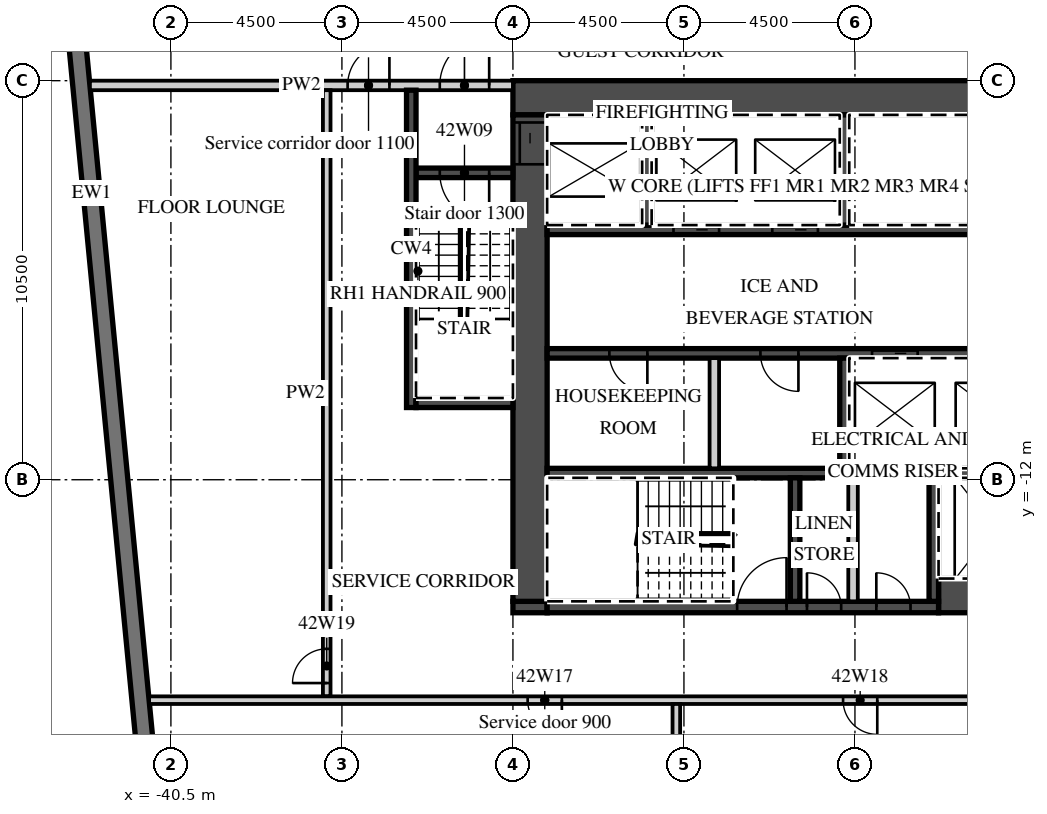
"""IFC4 building model, lengths in metres.
Left out: names, types, materials, properties, quantities, classifications, styles, units other than length and angle.
Written with IfcOpenShell. Run it as: python <this file> out.ifc"""

import sys

from ifc_helpers import new_model, si_unit, direction, frame, frame_2d, origin, place, context, subcontext, project, spatial, rectangle, extrude, element, fill, save


model = new_model("IFC4")
c1 = context("Model", 3, precision=1e-05, world=origin(), true_north=direction((0.0, 1.0)))
c2 = subcontext(c1, "Body", "Model", "MODEL_VIEW")
j1 = project(units=[si_unit("LENGTHUNIT", "METRE"), si_unit("PLANEANGLEUNIT", "RADIAN")], contexts=[c1])
p1 = place(None, origin())
s1 = spatial("IfcSite", under=j1, at=p1, CompositionType="ELEMENT")
p2 = place(p1, origin())
s2 = spatial("IfcBuilding", under=s1, at=p2, CompositionType="ELEMENT")
p3 = place(p2, frame((0.0, 0.0, 180.1)))
s3 = spatial("IfcBuildingStorey", under=s2, at=p3, CompositionType="ELEMENT", Elevation=180.1)
p4 = place(p3, frame((-44.214, 12.466, 0.0), z_axis=(0.0, 0.0, 1.0), x_axis=(0.095847314626, -0.995396047952, 0.0)))
e1 = element("IfcWall", 1, at=p4, inside=s3, PredefinedType="SOLIDWALL", context=c2, shape_type="SweptSolid", body=[
    extrude(rectangle(XDim=34.0, YDim=0.45, at=frame_2d((17.0, 0.0))), origin(), (0.0, 0.0, 1.0), 3.02),
])
p5 = place(p4, frame((2.865, 0.0, 0.45)))
e2 = element("IfcOpeningElement", 2, at=p5, cuts=e1, PredefinedType="OPENING", context=c2, shape_type="SweptSolid", body=[
    extrude(rectangle(XDim=3.3, YDim=2.25, at=frame_2d((1.65, 1.125))), frame((0.0, 0.235, 0.0), z_axis=(0.0, -1.0, 0.0), x_axis=(1.0, 0.0, 0.0)), (0.0, 0.0, 1.0), 0.47),
])
p6 = place(p4, frame((7.386, 0.0, 0.45)))
e3 = element("IfcOpeningElement", 3, at=p6, cuts=e1, PredefinedType="OPENING", context=c2, shape_type="SweptSolid", body=[
    extrude(rectangle(XDim=3.3, YDim=2.25, at=frame_2d((1.65, 1.125))), frame((0.0, 0.235, 0.0), z_axis=(0.0, -1.0, 0.0), x_axis=(1.0, 0.0, 0.0)), (0.0, 0.0, 1.0), 0.47),
])
p7 = place(p3, frame((-31.5, -1.95, 0.0), z_axis=(0.0, 0.0, 1.0), x_axis=(1.0, 0.0, 0.0)))
e4 = element("IfcWall", 4, at=p7, inside=s3, PredefinedType="SHEAR", context=c2, shape_type="SweptSolid", body=[
    extrude(rectangle(XDim=18.0, YDim=0.9, at=frame_2d((9.0, 0.0))), origin(), (0.0, 0.0, 1.0), 3.02),
])
p8 = place(p7, frame((14.725, 0.0, 0.0)))
e5 = element("IfcOpeningElement", 5, at=p8, cuts=e4, PredefinedType="OPENING", context=c2, shape_type="SweptSolid", body=[
    extrude(rectangle(XDim=1.8, YDim=2.1, at=frame_2d((0.9, 1.05))), frame((0.0, 0.46, 0.0), z_axis=(0.0, -1.0, 0.0), x_axis=(1.0, 0.0, 0.0)), (0.0, 0.0, 1.0), 0.92),
])
p9 = place(p3, frame((-20.3, -15.05, 0.0), z_axis=(0.0, 0.0, 1.0), x_axis=(1.0, 0.0, 0.0)))
e6 = element("IfcWall", 6, at=p9, inside=s3, PredefinedType="SHEAR", context=c2, shape_type="SweptSolid", body=[
    extrude(rectangle(XDim=6.8, YDim=0.9, at=frame_2d((3.4, 0.0))), origin(), (0.0, 0.0, 1.0), 3.02),
])
p10 = place(p9, frame((0.875, 0.0, 0.0)))
e7 = element("IfcOpeningElement", 7, at=p10, cuts=e6, PredefinedType="OPENING", context=c2, shape_type="SweptSolid", body=[
    extrude(rectangle(XDim=1.2, YDim=2.1, at=frame_2d((0.6, 1.05))), frame((0.0, 0.46, 0.0), z_axis=(0.0, -1.0, 0.0), x_axis=(1.0, 0.0, 0.0)), (0.0, 0.0, 1.0), 0.92),
])
p11 = place(p3, frame((-31.5, -15.35, 0.0), z_axis=(0.0, 0.0, 1.0), x_axis=(1.0, 0.0, 0.0)))
e8 = element("IfcWall", 8, at=p11, inside=s3, PredefinedType="SHEAR", context=c2, shape_type="SweptSolid", body=[
    extrude(rectangle(XDim=0.9, YDim=0.3, at=frame_2d((0.45, 0.0))), origin(), (0.0, 0.0, 1.0), 3.02),
])
p12 = place(p3, frame((-30.6, -15.35, 0.0), z_axis=(0.0, 0.0, 1.0), x_axis=(1.0, 0.0, 0.0)))
e9 = element("IfcWall", 9, at=p12, inside=s3, PredefinedType="SHEAR", context=c2, shape_type="SweptSolid", body=[
    extrude(rectangle(XDim=10.3, YDim=0.3, at=frame_2d((5.15, 0.0))), origin(), (0.0, 0.0, 1.0), 3.02),
])
p13 = place(p12, frame((5.0, 0.0, 0.0)))
e10 = element("IfcOpeningElement", 10, at=p13, cuts=e9, PredefinedType="OPENING", context=c2, shape_type="SweptSolid", body=[
    extrude(rectangle(XDim=1.3, YDim=2.1, at=frame_2d((0.65, 1.05))), frame((0.0, 0.16, 0.0), z_axis=(0.0, -1.0, 0.0), x_axis=(1.0, 0.0, 0.0)), (0.0, 0.0, 1.0), 0.32),
])
p14 = place(p12, frame((6.837, 0.0, 0.0)))
e11 = element("IfcOpeningElement", 11, at=p14, cuts=e9, PredefinedType="OPENING", context=c2, shape_type="SweptSolid", body=[
    extrude(rectangle(XDim=0.9, YDim=2.1, at=frame_2d((0.45, 1.05))), frame((0.0, 0.16, 0.0), z_axis=(0.0, -1.0, 0.0), x_axis=(1.0, 0.0, 0.0)), (0.0, 0.0, 1.0), 0.32),
])
p15 = place(p12, frame((8.663, 0.0, 0.0)))
e12 = element("IfcOpeningElement", 12, at=p15, cuts=e9, PredefinedType="OPENING", context=c2, shape_type="SweptSolid", body=[
    extrude(rectangle(XDim=0.9, YDim=2.1, at=frame_2d((0.45, 1.05))), frame((0.0, 0.16, 0.0), z_axis=(0.0, -1.0, 0.0), x_axis=(1.0, 0.0, 0.0)), (0.0, 0.0, 1.0), 0.32),
])
p16 = place(p3, frame((-31.05, -15.2, 0.0), z_axis=(0.0, 0.0, 1.0), x_axis=(0.0, 1.0, 0.0)))
e13 = element("IfcWall", 13, at=p16, inside=s3, PredefinedType="SHEAR", context=c2, shape_type="SweptSolid", body=[
    extrude(rectangle(XDim=12.8, YDim=0.9, at=frame_2d((6.4, 0.0))), origin(), (0.0, 0.0, 1.0), 3.02),
])
p17 = place(p16, frame((11.5, 0.0, 0.0)))
e14 = element("IfcOpeningElement", 14, at=p17, cuts=e13, PredefinedType="OPENING", context=c2, shape_type="SweptSolid", body=[
    extrude(rectangle(XDim=1.1, YDim=2.1, at=frame_2d((0.55, 1.05))), frame((0.0, 0.46, 0.0), z_axis=(0.0, -1.0, 0.0), x_axis=(1.0, 0.0, 0.0)), (0.0, 0.0, 1.0), 0.92),
])
p18 = place(p3, frame((-30.6, -5.425, 0.0), z_axis=(0.0, 0.0, 1.0), x_axis=(1.0, 0.0, 0.0)))
e15 = element("IfcWall", 15, at=p18, inside=s3, PredefinedType="SHEAR", context=c2, shape_type="SweptSolid", body=[
    extrude(rectangle(XDim=13.0, YDim=0.25, at=frame_2d((6.5, 0.0))), origin(), (0.0, 0.0, 1.0), 3.02),
])
p19 = place(p18, frame((3.325, 0.0, 0.0)))
e16 = element("IfcOpeningElement", 16, at=p19, cuts=e15, PredefinedType="OPENING", context=c2, shape_type="SweptSolid", body=[
    extrude(rectangle(XDim=1.2, YDim=2.1, at=frame_2d((0.6, 1.05))), frame((0.0, 0.135, 0.0), z_axis=(0.0, -1.0, 0.0), x_axis=(1.0, 0.0, 0.0)), (0.0, 0.0, 1.0), 0.27),
])
p20 = place(p18, frame((5.925, 0.0, 0.0)))
e17 = element("IfcOpeningElement", 17, at=p20, cuts=e15, PredefinedType="OPENING", context=c2, shape_type="SweptSolid", body=[
    extrude(rectangle(XDim=1.2, YDim=2.1, at=frame_2d((0.6, 1.05))), frame((0.0, 0.135, 0.0), z_axis=(0.0, -1.0, 0.0), x_axis=(1.0, 0.0, 0.0)), (0.0, 0.0, 1.0), 0.27),
])
for number, where, z_axis, x_axis in (
    (18, (-27.975, -5.3, 0.0), (0.0, 0.0, 1.0), (0.0, 1.0, 0.0)),
    (19, (-22.775, -5.3, 0.0), (0.0, 0.0, 1.0), (0.0, 1.0, 0.0)),
):
    element("IfcWall", number, at=place(p3, frame(where, z_axis=z_axis, x_axis=x_axis)), inside=s3, PredefinedType="SHEAR", context=c2, shape_type="SweptSolid", body=[
        extrude(rectangle(XDim=2.9, YDim=0.25, at=frame_2d((1.45, 0.0))), origin(), (0.0, 0.0, 1.0), 3.02),
    ])
p21 = place(p3, frame((-30.6, -8.675, 0.0), z_axis=(0.0, 0.0, 1.0), x_axis=(1.0, 0.0, 0.0)))
e20 = element("IfcWall", 20, at=p21, inside=s3, PredefinedType="SHEAR", context=c2, shape_type="SweptSolid", body=[
    extrude(rectangle(XDim=16.2, YDim=0.25, at=frame_2d((8.1, 0.0))), origin(), (0.0, 0.0, 1.0), 3.02),
])
p22 = place(p21, frame((8.55, 0.0, 0.0)))
e21 = element("IfcOpeningElement", 21, at=p22, cuts=e20, PredefinedType="OPENING", context=c2, shape_type="SweptSolid", body=[
    extrude(rectangle(XDim=1.2, YDim=2.1, at=frame_2d((0.6, 1.05))), frame((0.0, 0.135, 0.0), z_axis=(0.0, -1.0, 0.0), x_axis=(1.0, 0.0, 0.0)), (0.0, 0.0, 1.0), 0.27),
])
p23 = place(p21, frame((11.2, 0.0, 0.0)))
e22 = element("IfcOpeningElement", 22, at=p23, cuts=e20, PredefinedType="OPENING", context=c2, shape_type="SweptSolid", body=[
    extrude(rectangle(XDim=1.2, YDim=2.1, at=frame_2d((0.6, 1.05))), frame((0.0, 0.135, 0.0), z_axis=(0.0, -1.0, 0.0), x_axis=(1.0, 0.0, 0.0)), (0.0, 0.0, 1.0), 0.27),
])
p24 = place(p21, frame((14.25, 0.0, 0.0)))
e23 = element("IfcOpeningElement", 23, at=p24, cuts=e20, PredefinedType="OPENING", context=c2, shape_type="SweptSolid", body=[
    extrude(rectangle(XDim=1.3, YDim=2.1, at=frame_2d((0.65, 1.05))), frame((0.0, 0.135, 0.0), z_axis=(0.0, -1.0, 0.0), x_axis=(1.0, 0.0, 0.0)), (0.0, 0.0, 1.0), 0.27),
])
p25 = place(p21, frame((1.637, 0.0, 0.0)))
e24 = element("IfcOpeningElement", 24, at=p25, cuts=e20, PredefinedType="OPENING", context=c2, shape_type="SweptSolid", body=[
    extrude(rectangle(XDim=1.0, YDim=2.1, at=frame_2d((0.5, 1.05))), frame((0.0, 0.135, 0.0), z_axis=(0.0, -1.0, 0.0), x_axis=(1.0, 0.0, 0.0)), (0.0, 0.0, 1.0), 0.27),
])
p26 = place(p21, frame((5.613, 0.0, 0.0)))
e25 = element("IfcOpeningElement", 25, at=p26, cuts=e20, PredefinedType="OPENING", context=c2, shape_type="SweptSolid", body=[
    extrude(rectangle(XDim=1.0, YDim=2.1, at=frame_2d((0.5, 1.05))), frame((0.0, 0.135, 0.0), z_axis=(0.0, -1.0, 0.0), x_axis=(1.0, 0.0, 0.0)), (0.0, 0.0, 1.0), 0.27),
])
p27 = place(p3, frame((-30.6, -11.825, 0.0), z_axis=(0.0, 0.0, 1.0), x_axis=(1.0, 0.0, 0.0)))
e26 = element("IfcWall", 26, at=p27, inside=s3, PredefinedType="SHEAR", context=c2, shape_type="SweptSolid", body=[
    extrude(rectangle(XDim=13.25, YDim=0.25, at=frame_2d((6.625, 0.0))), origin(), (0.0, 0.0, 1.0), 3.02),
])
p28 = place(p3, frame((-22.775, -11.7, 0.0), z_axis=(0.0, 0.0, 1.0), x_axis=(0.0, 1.0, 0.0)))
e27 = element("IfcWall", 27, at=p28, inside=s3, PredefinedType="SHEAR", context=c2, shape_type="SweptSolid", body=[
    extrude(rectangle(XDim=2.9, YDim=0.25, at=frame_2d((1.45, 0.0))), origin(), (0.0, 0.0, 1.0), 3.02),
])
p29 = place(p3, frame((-26.2, -11.7, 0.0), z_axis=(0.0, 0.0, 1.0), x_axis=(0.0, 1.0, 0.0)))
e28 = element("IfcWall", 28, at=p29, inside=s3, PredefinedType="PARTITIONING", context=c2, shape_type="SweptSolid", body=[
    extrude(rectangle(XDim=2.9, YDim=0.25, at=frame_2d((1.45, 0.0))), origin(), (0.0, 0.0, 1.0), 3.02),
])
for number, where, z_axis, x_axis in (
    (29, (-20.425, -15.2, 0.0), (0.0, 0.0, 1.0), (0.0, 1.0, 0.0)),
    (30, (-24.075, -15.2, 0.0), (0.0, 0.0, 1.0), (0.0, 1.0, 0.0)),
):
    element("IfcWall", number, at=place(p3, frame(where, z_axis=z_axis, x_axis=x_axis)), inside=s3, PredefinedType="SHEAR", context=c2, shape_type="SweptSolid", body=[
        extrude(rectangle(XDim=3.25, YDim=0.25, at=frame_2d((1.625, 0.0))), origin(), (0.0, 0.0, 1.0), 3.02),
    ])
p30 = place(p3, frame((-22.55, -15.2, 0.0), z_axis=(0.0, 0.0, 1.0), x_axis=(0.0, 1.0, 0.0)))
e31 = element("IfcWall", 31, at=p30, inside=s3, PredefinedType="PARTITIONING", context=c2, shape_type="SweptSolid", body=[
    extrude(rectangle(XDim=3.25, YDim=0.25, at=frame_2d((1.625, 0.0))), origin(), (0.0, 0.0, 1.0), 3.02),
])
p31 = place(p3, frame((-42.632, -1.625, 0.0), z_axis=(0.0, 0.0, 1.0), x_axis=(1.0, 0.0, 0.0)))
e32 = element("IfcWall", 32, at=p31, inside=s3, PredefinedType="PARTITIONING", context=c2, shape_type="SweptSolid", body=[
    extrude(rectangle(XDim=11.132, YDim=0.25, at=frame_2d((5.566, 0.0))), origin(), (0.0, 0.0, 1.0), 3.02),
])
p32 = place(p31, frame((9.207, 0.0, 0.0)))
e33 = element("IfcOpeningElement", 33, at=p32, cuts=e32, PredefinedType="OPENING", context=c2, shape_type="SweptSolid", body=[
    extrude(rectangle(XDim=1.3, YDim=2.1, at=frame_2d((0.65, 1.05))), frame((0.0, 0.135, 0.0), z_axis=(0.0, -1.0, 0.0), x_axis=(1.0, 0.0, 0.0)), (0.0, 0.0, 1.0), 0.27),
])
p33 = place(p31, frame((6.781, 0.0, 0.0)))
e34 = element("IfcOpeningElement", 34, at=p33, cuts=e32, PredefinedType="OPENING", context=c2, shape_type="SweptSolid", body=[
    extrude(rectangle(XDim=1.1, YDim=2.1, at=frame_2d((0.55, 1.05))), frame((0.0, 0.135, 0.0), z_axis=(0.0, -1.0, 0.0), x_axis=(1.0, 0.0, 0.0)), (0.0, 0.0, 1.0), 0.27),
])
p34 = place(p3, frame((-34.05, -3.925, 0.0), z_axis=(0.0, 0.0, 1.0), x_axis=(1.0, 0.0, 0.0)))
e35 = element("IfcWall", 35, at=p34, inside=s3, PredefinedType="SHEAR", context=c2, shape_type="SweptSolid", body=[
    extrude(rectangle(XDim=2.55, YDim=0.25, at=frame_2d((1.275, 0.0))), origin(), (0.0, 0.0, 1.0), 3.02),
])
p35 = place(p34, frame((0.625, 0.0, 0.0)))
e36 = element("IfcOpeningElement", 36, at=p35, cuts=e35, PredefinedType="OPENING", context=c2, shape_type="SweptSolid", body=[
    extrude(rectangle(XDim=1.3, YDim=2.1, at=frame_2d((0.65, 1.05))), frame((0.0, 0.135, 0.0), z_axis=(0.0, -1.0, 0.0), x_axis=(1.0, 0.0, 0.0)), (0.0, 0.0, 1.0), 0.27),
])
p36 = place(p3, frame((-34.175, -10.1, 0.0), z_axis=(0.0, 0.0, 1.0), x_axis=(0.0, 1.0, 0.0)))
e37 = element("IfcWall", 37, at=p36, inside=s3, PredefinedType="SHEAR", context=c2, shape_type="SweptSolid", body=[
    extrude(rectangle(XDim=8.35, YDim=0.25, at=frame_2d((4.175, 0.0))), origin(), (0.0, 0.0, 1.0), 3.02),
])
p37 = place(p3, frame((-34.05, -9.975, 0.0), z_axis=(0.0, 0.0, 1.0), x_axis=(1.0, 0.0, 0.0)))
e38 = element("IfcWall", 38, at=p37, inside=s3, PredefinedType="SHEAR", context=c2, shape_type="SweptSolid", body=[
    extrude(rectangle(XDim=2.55, YDim=0.25, at=frame_2d((1.275, 0.0))), origin(), (0.0, 0.0, 1.0), 3.02),
])
p38 = place(p3, frame((-36.4, -17.7, 0.0), z_axis=(0.0, 0.0, 1.0), x_axis=(0.0, 1.0, 0.0)))
e39 = element("IfcWall", 39, at=p38, inside=s3, PredefinedType="PARTITIONING", context=c2, shape_type="SweptSolid", body=[
    extrude(rectangle(XDim=15.95, YDim=0.2, at=frame_2d((7.975, 0.0))), origin(), (0.0, 0.0, 1.0), 3.02),
])
p39 = place(p38, frame((0.35, 0.0, 0.0)))
e40 = element("IfcOpeningElement", 40, at=p39, cuts=e39, PredefinedType="OPENING", context=c2, shape_type="SweptSolid", body=[
    extrude(rectangle(XDim=0.9, YDim=2.1, at=frame_2d((0.45, 1.05))), frame((0.0, 0.11, 0.0), z_axis=(0.0, -1.0, 0.0), x_axis=(1.0, 0.0, 0.0)), (0.0, 0.0, 1.0), 0.22),
])
p40 = place(p3, frame((-41.074, -17.8, 0.0), z_axis=(0.0, 0.0, 1.0), x_axis=(1.0, 0.0, 0.0)))
e41 = element("IfcWall", 41, at=p40, inside=s3, PredefinedType="PARTITIONING", context=c2, shape_type="SweptSolid", body=[
    extrude(rectangle(XDim=27.474, YDim=0.2, at=frame_2d((13.737, 0.0))), origin(), (0.0, 0.0, 1.0), 3.02),
])
p41 = place(p40, frame((9.962, 0.0, 0.0)))
e42 = element("IfcOpeningElement", 42, at=p41, cuts=e41, PredefinedType="OPENING", context=c2, shape_type="SweptSolid", body=[
    extrude(rectangle(XDim=0.9, YDim=2.1, at=frame_2d((0.45, 1.05))), frame((0.0, 0.11, 0.0), z_axis=(0.0, -1.0, 0.0), x_axis=(1.0, 0.0, 0.0)), (0.0, 0.0, 1.0), 0.22),
])
p42 = place(p40, frame((18.262, 0.0, 0.0)))
e43 = element("IfcOpeningElement", 43, at=p42, cuts=e41, PredefinedType="OPENING", context=c2, shape_type="SweptSolid", body=[
    extrude(rectangle(XDim=0.9, YDim=2.1, at=frame_2d((0.45, 1.05))), frame((0.0, 0.11, 0.0), z_axis=(0.0, -1.0, 0.0), x_axis=(1.0, 0.0, 0.0)), (0.0, 0.0, 1.0), 0.22),
])
p43 = place(p3, frame((-27.2, -23.621, 0.0), z_axis=(0.0, 0.0, 1.0), x_axis=(0.0, 1.0, 0.0)))
e44 = element("IfcWall", 44, at=p43, inside=s3, PredefinedType="PARTITIONING", context=c2, shape_type="SweptSolid", body=[
    extrude(rectangle(XDim=5.721, YDim=0.2, at=frame_2d((2.86, 0.0))), origin(), (0.0, 0.0, 1.0), 3.02),
])
p44 = place(p22, origin())
e45 = element("IfcDoor", 45, at=p44, inside=s3, OperationType="SLIDING_TO_LEFT", PredefinedType="DOOR", context=c2, shape_type="SweptSolid", body=[
    extrude(rectangle(XDim=1.2, YDim=2.1, at=frame_2d((0.6, 1.05))), frame((0.0, 0.025, 0.0), z_axis=(0.0, -1.0, 0.0), x_axis=(1.0, 0.0, 0.0)), (0.0, 0.0, 1.0), 0.05),
])
fill(e21, e45)
p45 = place(p19, origin())
e46 = element("IfcDoor", 46, at=p45, inside=s3, OperationType="SLIDING_TO_RIGHT", PredefinedType="DOOR", context=c2, shape_type="SweptSolid", body=[
    extrude(rectangle(XDim=1.2, YDim=2.1, at=frame_2d((0.6, 1.05))), frame((0.0, 0.025, 0.0), z_axis=(0.0, -1.0, 0.0), x_axis=(1.0, 0.0, 0.0)), (0.0, 0.0, 1.0), 0.05),
])
fill(e16, e46)
p46 = place(p20, origin())
e47 = element("IfcDoor", 47, at=p46, inside=s3, OperationType="SLIDING_TO_RIGHT", PredefinedType="DOOR", context=c2, shape_type="SweptSolid", body=[
    extrude(rectangle(XDim=1.2, YDim=2.1, at=frame_2d((0.6, 1.05))), frame((0.0, 0.025, 0.0), z_axis=(0.0, -1.0, 0.0), x_axis=(1.0, 0.0, 0.0)), (0.0, 0.0, 1.0), 0.05),
])
fill(e17, e47)
p47 = place(p17, origin())
e48 = element("IfcDoor", 48, at=p47, inside=s3, OperationType="SLIDING_TO_RIGHT", PredefinedType="DOOR", context=c2, shape_type="SweptSolid", body=[
    extrude(rectangle(XDim=1.1, YDim=2.1, at=frame_2d((0.55, 1.05))), frame((0.0, 0.025, 0.0), z_axis=(0.0, -1.0, 0.0), x_axis=(1.0, 0.0, 0.0)), (0.0, 0.0, 1.0), 0.05),
])
fill(e14, e48)
p48 = place(p32, origin())
e49 = element("IfcDoor", 49, at=p48, inside=s3, OperationType="SINGLE_SWING_RIGHT", PredefinedType="DOOR", context=c2, shape_type="SweptSolid", body=[
    extrude(rectangle(XDim=1.3, YDim=2.1, at=frame_2d((0.65, 1.05))), frame((0.0, 0.025, 0.0), z_axis=(0.0, -1.0, 0.0), x_axis=(1.0, 0.0, 0.0)), (0.0, 0.0, 1.0), 0.05),
])
fill(e33, e49)
p49 = place(p35, origin())
e50 = element("IfcDoor", 50, at=p49, inside=s3, OperationType="SINGLE_SWING_RIGHT", PredefinedType="DOOR", context=c2, shape_type="SweptSolid", body=[
    extrude(rectangle(XDim=1.3, YDim=2.1, at=frame_2d((0.65, 1.05))), frame((0.0, 0.025, 0.0), z_axis=(0.0, -1.0, 0.0), x_axis=(1.0, 0.0, 0.0)), (0.0, 0.0, 1.0), 0.05),
])
fill(e36, e50)
p50 = place(p33, origin())
e51 = element("IfcDoor", 51, at=p50, inside=s3, OperationType="SINGLE_SWING_RIGHT", PredefinedType="DOOR", context=c2, shape_type="SweptSolid", body=[
    extrude(rectangle(XDim=1.1, YDim=2.1, at=frame_2d((0.55, 1.05))), frame((0.0, 0.025, 0.0), z_axis=(0.0, -1.0, 0.0), x_axis=(1.0, 0.0, 0.0)), (0.0, 0.0, 1.0), 0.05),
])
fill(e34, e51)
p51 = place(p13, origin())
e52 = element("IfcDoor", 52, at=p51, inside=s3, OperationType="SINGLE_SWING_RIGHT", PredefinedType="DOOR", context=c2, shape_type="SweptSolid", body=[
    extrude(rectangle(XDim=1.3, YDim=2.1, at=frame_2d((0.65, 1.05))), frame((0.0, 0.025, 0.0), z_axis=(0.0, -1.0, 0.0), x_axis=(1.0, 0.0, 0.0)), (0.0, 0.0, 1.0), 0.05),
])
fill(e10, e52)
p52 = place(p14, origin())
e53 = element("IfcDoor", 53, at=p52, inside=s3, OperationType="SINGLE_SWING_LEFT", PredefinedType="DOOR", context=c2, shape_type="SweptSolid", body=[
    extrude(rectangle(XDim=0.9, YDim=2.1, at=frame_2d((0.45, 1.05))), frame((0.0, 0.025, 0.0), z_axis=(0.0, -1.0, 0.0), x_axis=(1.0, 0.0, 0.0)), (0.0, 0.0, 1.0), 0.05),
])
fill(e11, e53)
p53 = place(p15, origin())
e54 = element("IfcDoor", 54, at=p53, inside=s3, OperationType="SINGLE_SWING_LEFT", PredefinedType="DOOR", context=c2, shape_type="SweptSolid", body=[
    extrude(rectangle(XDim=0.9, YDim=2.1, at=frame_2d((0.45, 1.05))), frame((0.0, 0.025, 0.0), z_axis=(0.0, -1.0, 0.0), x_axis=(1.0, 0.0, 0.0)), (0.0, 0.0, 1.0), 0.05),
])
fill(e12, e54)
p54 = place(p25, origin())
e55 = element("IfcDoor", 55, at=p54, inside=s3, OperationType="SINGLE_SWING_RIGHT", PredefinedType="DOOR", context=c2, shape_type="SweptSolid", body=[
    extrude(rectangle(XDim=1.0, YDim=2.1, at=frame_2d((0.5, 1.05))), frame((0.0, 0.025, 0.0), z_axis=(0.0, -1.0, 0.0), x_axis=(1.0, 0.0, 0.0)), (0.0, 0.0, 1.0), 0.05),
])
fill(e24, e55)
p55 = place(p26, origin())
e56 = element("IfcDoor", 56, at=p55, inside=s3, OperationType="SINGLE_SWING_RIGHT", PredefinedType="DOOR", context=c2, shape_type="SweptSolid", body=[
    extrude(rectangle(XDim=1.0, YDim=2.1, at=frame_2d((0.5, 1.05))), frame((0.0, 0.025, 0.0), z_axis=(0.0, -1.0, 0.0), x_axis=(1.0, 0.0, 0.0)), (0.0, 0.0, 1.0), 0.05),
])
fill(e25, e56)
p56 = place(p41, origin())
e57 = element("IfcDoor", 57, at=p56, inside=s3, OperationType="SINGLE_SWING_RIGHT", PredefinedType="DOOR", context=c2, shape_type="SweptSolid", body=[
    extrude(rectangle(XDim=0.9, YDim=2.1, at=frame_2d((0.45, 1.05))), frame((0.0, 0.025, 0.0), z_axis=(0.0, -1.0, 0.0), x_axis=(1.0, 0.0, 0.0)), (0.0, 0.0, 1.0), 0.05),
])
fill(e42, e57)
p57 = place(p42, origin())
e58 = element("IfcDoor", 58, at=p57, inside=s3, OperationType="SINGLE_SWING_RIGHT", PredefinedType="DOOR", context=c2, shape_type="SweptSolid", body=[
    extrude(rectangle(XDim=0.9, YDim=2.1, at=frame_2d((0.45, 1.05))), frame((0.0, 0.025, 0.0), z_axis=(0.0, -1.0, 0.0), x_axis=(1.0, 0.0, 0.0)), (0.0, 0.0, 1.0), 0.05),
])
fill(e43, e58)
p58 = place(p39, origin())
e59 = element("IfcDoor", 59, at=p58, inside=s3, OperationType="SINGLE_SWING_LEFT", PredefinedType="DOOR", context=c2, shape_type="SweptSolid", body=[
    extrude(rectangle(XDim=0.9, YDim=2.1, at=frame_2d((0.45, 1.05))), frame((0.0, 0.025, 0.0), z_axis=(0.0, -1.0, 0.0), x_axis=(1.0, 0.0, 0.0)), (0.0, 0.0, 1.0), 0.05),
])
fill(e40, e59)
save(model, sys.argv[1])
